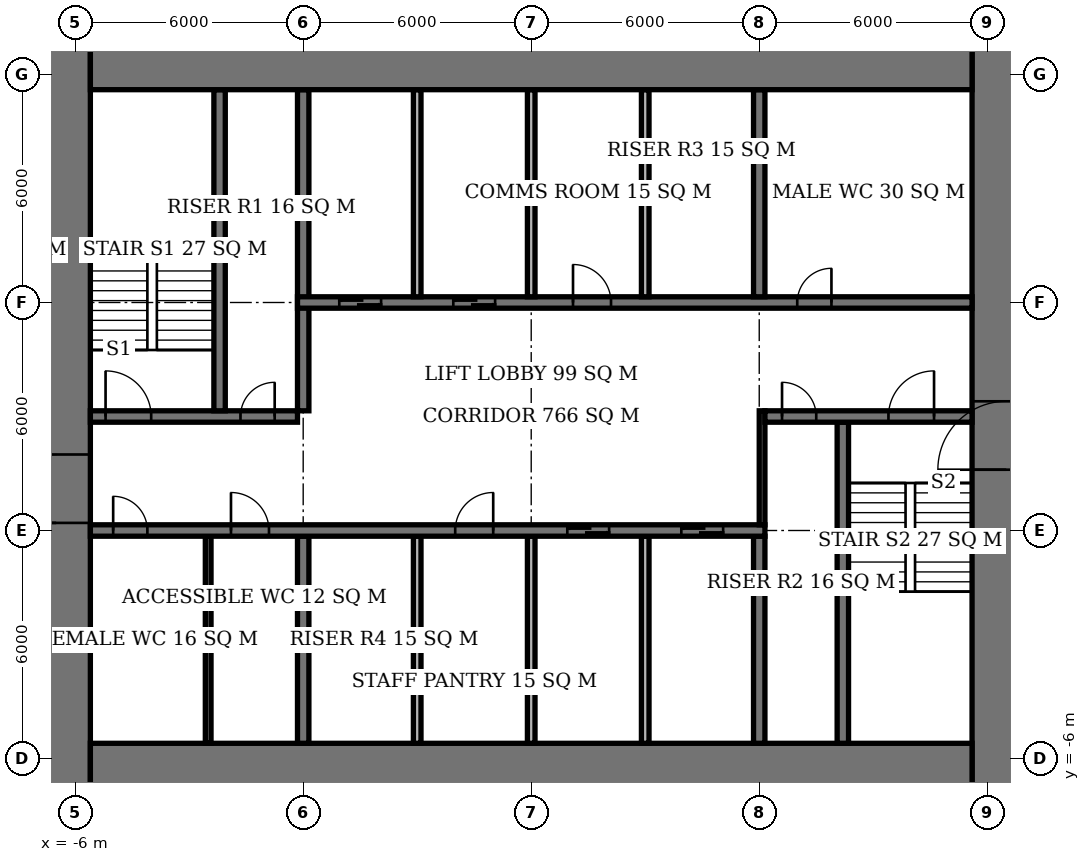
"""IFC4 building model, lengths in metres.
Left out: names, types, materials, properties, quantities, classifications, styles, units other than length and angle.
Written with IfcOpenShell. Run it as: python <this file> out.ifc"""

import sys

from ifc_helpers import new_model, si_unit, direction, frame, frame_2d, origin, place, context, subcontext, project, spatial, rectangle, extrude, element, fill, save


model = new_model("IFC4")
c1 = context("Model", 3, precision=1e-05, world=origin(), true_north=direction((0.0, 1.0)))
c2 = subcontext(c1, "Body", "Model", "MODEL_VIEW")
j1 = project(units=[si_unit("LENGTHUNIT", "METRE"), si_unit("PLANEANGLEUNIT", "RADIAN")], contexts=[c1])
p1 = place(None, origin())
s1 = spatial("IfcSite", under=j1, at=p1, CompositionType="ELEMENT")
p2 = place(p1, origin())
s2 = spatial("IfcBuilding", under=s1, at=p2, CompositionType="ELEMENT")
p3 = place(p2, frame((0.0, 0.0, 235.7)))
s3 = spatial("IfcBuildingStorey", under=s2, at=p3, CompositionType="ELEMENT", Elevation=235.7)
for number, where, z_axis, x_axis in (
    (1, (-5.6, -6.6, 0.0), (0.0, 0.0, 1.0), (1.0, 0.0, 0.0)),
    (2, (-5.6, 12.6, 0.0), (0.0, 0.0, 1.0), (1.0, 0.0, 0.0)),
):
    element("IfcWall", number, at=place(p3, frame(where, z_axis=z_axis, x_axis=x_axis)), inside=s3, PredefinedType="SHEAR", context=c2, shape_type="SweptSolid", body=[
        extrude(rectangle(XDim=23.2, YDim=2.0, at=frame_2d((11.6, 0.0))), origin(), (0.0, 0.0, 1.0), 3.9),
    ])
p4 = place(p3, frame((-6.5, -7.6, 0.0), z_axis=(0.0, 0.0, 1.0), x_axis=(0.0, 1.0, 0.0)))
e3 = element("IfcWall", 3, at=p4, inside=s3, PredefinedType="SHEAR", context=c2, shape_type="SweptSolid", body=[
    extrude(rectangle(XDim=21.2, YDim=1.8, at=frame_2d((10.6, 0.0))), origin(), (0.0, 0.0, 1.0), 3.9),
])
p5 = place(p4, frame((7.8, 0.0, 0.0)))
e4 = element("IfcOpeningElement", 4, at=p5, cuts=e3, PredefinedType="OPENING", context=c2, shape_type="SweptSolid", body=[
    extrude(rectangle(XDim=1.8, YDim=2.4, at=frame_2d((0.9, 1.2))), frame((0.0, 0.91, 0.0), z_axis=(0.0, -1.0, 0.0), x_axis=(1.0, 0.0, 0.0)), (0.0, 0.0, 1.0), 1.82),
])
p6 = place(p3, frame((18.5, -7.6, 0.0), z_axis=(0.0, 0.0, 1.0), x_axis=(0.0, 1.0, 0.0)))
e5 = element("IfcWall", 5, at=p6, inside=s3, PredefinedType="SHEAR", context=c2, shape_type="SweptSolid", body=[
    extrude(rectangle(XDim=21.2, YDim=1.8, at=frame_2d((10.6, 0.0))), origin(), (0.0, 0.0, 1.0), 3.9),
])
p7 = place(p6, frame((9.2, 0.0, 0.0)))
e6 = element("IfcOpeningElement", 6, at=p7, cuts=e5, PredefinedType="OPENING", context=c2, shape_type="SweptSolid", body=[
    extrude(rectangle(XDim=1.8, YDim=2.4, at=frame_2d((0.9, 1.2))), frame((0.0, 0.91, 0.0), z_axis=(0.0, -1.0, 0.0), x_axis=(1.0, 0.0, 0.0)), (0.0, 0.0, 1.0), 1.82),
])
p8 = place(p3, frame((-5.6, 0.0, 0.0), z_axis=(0.0, 0.0, 1.0), x_axis=(1.0, 0.0, 0.0)))
e7 = element("IfcWall", 7, at=p8, inside=s3, PredefinedType="SHEAR", context=c2, shape_type="SweptSolid", body=[
    extrude(rectangle(XDim=17.75, YDim=0.3, at=frame_2d((8.875, 0.0))), origin(), (0.0, 0.0, 1.0), 3.9),
])
p9 = place(p8, frame((0.6, 0.0, 0.0)))
e8 = element("IfcOpeningElement", 8, at=p9, cuts=e7, PredefinedType="OPENING", context=c2, shape_type="SweptSolid", body=[
    extrude(rectangle(XDim=0.9, YDim=2.1, at=frame_2d((0.45, 1.05))), frame((0.0, 0.16, 0.0), z_axis=(0.0, -1.0, 0.0), x_axis=(1.0, 0.0, 0.0)), (0.0, 0.0, 1.0), 0.32),
])
p10 = place(p8, frame((3.7, 0.0, 0.0)))
e9 = element("IfcOpeningElement", 9, at=p10, cuts=e7, PredefinedType="OPENING", context=c2, shape_type="SweptSolid", body=[
    extrude(rectangle(XDim=1.0, YDim=2.1, at=frame_2d((0.5, 1.05))), frame((0.0, 0.16, 0.0), z_axis=(0.0, -1.0, 0.0), x_axis=(1.0, 0.0, 0.0)), (0.0, 0.0, 1.0), 0.32),
])
p11 = place(p8, frame((9.6, 0.0, 0.0)))
e10 = element("IfcOpeningElement", 10, at=p11, cuts=e7, PredefinedType="OPENING", context=c2, shape_type="SweptSolid", body=[
    extrude(rectangle(XDim=1.0, YDim=2.1, at=frame_2d((0.5, 1.05))), frame((0.0, 0.16, 0.0), z_axis=(0.0, -1.0, 0.0), x_axis=(1.0, 0.0, 0.0)), (0.0, 0.0, 1.0), 0.32),
])
p12 = place(p8, frame((12.55, 0.0, 0.0)))
e11 = element("IfcOpeningElement", 11, at=p12, cuts=e7, PredefinedType="OPENING", context=c2, shape_type="SweptSolid", body=[
    extrude(rectangle(XDim=1.1, YDim=2.1, at=frame_2d((0.55, 1.05))), frame((0.0, 0.16, 0.0), z_axis=(0.0, -1.0, 0.0), x_axis=(1.0, 0.0, 0.0)), (0.0, 0.0, 1.0), 0.32),
])
p13 = place(p8, frame((15.55, 0.0, 0.0)))
e12 = element("IfcOpeningElement", 12, at=p13, cuts=e7, PredefinedType="OPENING", context=c2, shape_type="SweptSolid", body=[
    extrude(rectangle(XDim=1.1, YDim=2.1, at=frame_2d((0.55, 1.05))), frame((0.0, 0.16, 0.0), z_axis=(0.0, -1.0, 0.0), x_axis=(1.0, 0.0, 0.0)), (0.0, 0.0, 1.0), 0.32),
])
p14 = place(p3, frame((-5.6, 3.0, 0.0), z_axis=(0.0, 0.0, 1.0), x_axis=(1.0, 0.0, 0.0)))
e13 = element("IfcWall", 13, at=p14, inside=s3, PredefinedType="SHEAR", context=c2, shape_type="SweptSolid", body=[
    extrude(rectangle(XDim=5.45, YDim=0.3, at=frame_2d((2.725, 0.0))), origin(), (0.0, 0.0, 1.0), 3.9),
])
p15 = place(p14, frame((0.4, 0.0, 0.0)))
e14 = element("IfcOpeningElement", 14, at=p15, cuts=e13, PredefinedType="OPENING", context=c2, shape_type="SweptSolid", body=[
    extrude(rectangle(XDim=1.2, YDim=2.1, at=frame_2d((0.6, 1.05))), frame((0.0, 0.16, 0.0), z_axis=(0.0, -1.0, 0.0), x_axis=(1.0, 0.0, 0.0)), (0.0, 0.0, 1.0), 0.32),
])
p16 = place(p14, frame((3.95, 0.0, 0.0)))
e15 = element("IfcOpeningElement", 15, at=p16, cuts=e13, PredefinedType="OPENING", context=c2, shape_type="SweptSolid", body=[
    extrude(rectangle(XDim=0.9, YDim=2.1, at=frame_2d((0.45, 1.05))), frame((0.0, 0.16, 0.0), z_axis=(0.0, -1.0, 0.0), x_axis=(1.0, 0.0, 0.0)), (0.0, 0.0, 1.0), 0.32),
])
p17 = place(p3, frame((12.15, 3.0, 0.0), z_axis=(0.0, 0.0, 1.0), x_axis=(1.0, 0.0, 0.0)))
e16 = element("IfcWall", 16, at=p17, inside=s3, PredefinedType="SHEAR", context=c2, shape_type="SweptSolid", body=[
    extrude(rectangle(XDim=5.45, YDim=0.3, at=frame_2d((2.725, 0.0))), origin(), (0.0, 0.0, 1.0), 3.9),
])
p18 = place(p17, frame((3.25, 0.0, 0.0)))
e17 = element("IfcOpeningElement", 17, at=p18, cuts=e16, PredefinedType="OPENING", context=c2, shape_type="SweptSolid", body=[
    extrude(rectangle(XDim=1.2, YDim=2.1, at=frame_2d((0.6, 1.05))), frame((0.0, 0.16, 0.0), z_axis=(0.0, -1.0, 0.0), x_axis=(1.0, 0.0, 0.0)), (0.0, 0.0, 1.0), 0.32),
])
p19 = place(p17, frame((0.45, 0.0, 0.0)))
e18 = element("IfcOpeningElement", 18, at=p19, cuts=e16, PredefinedType="OPENING", context=c2, shape_type="SweptSolid", body=[
    extrude(rectangle(XDim=0.9, YDim=2.1, at=frame_2d((0.45, 1.05))), frame((0.0, 0.16, 0.0), z_axis=(0.0, -1.0, 0.0), x_axis=(1.0, 0.0, 0.0)), (0.0, 0.0, 1.0), 0.32),
])
p20 = place(p3, frame((-0.15, 6.0, 0.0), z_axis=(0.0, 0.0, 1.0), x_axis=(1.0, 0.0, 0.0)))
e19 = element("IfcWall", 19, at=p20, inside=s3, PredefinedType="SHEAR", context=c2, shape_type="SweptSolid", body=[
    extrude(rectangle(XDim=17.75, YDim=0.3, at=frame_2d((8.875, 0.0))), origin(), (0.0, 0.0, 1.0), 3.9),
])
p21 = place(p20, frame((13.15, 0.0, 0.0)))
e20 = element("IfcOpeningElement", 20, at=p21, cuts=e19, PredefinedType="OPENING", context=c2, shape_type="SweptSolid", body=[
    extrude(rectangle(XDim=0.9, YDim=2.1, at=frame_2d((0.45, 1.05))), frame((0.0, 0.16, 0.0), z_axis=(0.0, -1.0, 0.0), x_axis=(1.0, 0.0, 0.0)), (0.0, 0.0, 1.0), 0.32),
])
p22 = place(p20, frame((7.25, 0.0, 0.0)))
e21 = element("IfcOpeningElement", 21, at=p22, cuts=e19, PredefinedType="OPENING", context=c2, shape_type="SweptSolid", body=[
    extrude(rectangle(XDim=1.0, YDim=2.1, at=frame_2d((0.5, 1.05))), frame((0.0, 0.16, 0.0), z_axis=(0.0, -1.0, 0.0), x_axis=(1.0, 0.0, 0.0)), (0.0, 0.0, 1.0), 0.32),
])
p23 = place(p20, frame((1.1, 0.0, 0.0)))
e22 = element("IfcOpeningElement", 22, at=p23, cuts=e19, PredefinedType="OPENING", context=c2, shape_type="SweptSolid", body=[
    extrude(rectangle(XDim=1.1, YDim=2.1, at=frame_2d((0.55, 1.05))), frame((0.0, 0.16, 0.0), z_axis=(0.0, -1.0, 0.0), x_axis=(1.0, 0.0, 0.0)), (0.0, 0.0, 1.0), 0.32),
])
p24 = place(p20, frame((4.1, 0.0, 0.0)))
e23 = element("IfcOpeningElement", 23, at=p24, cuts=e19, PredefinedType="OPENING", context=c2, shape_type="SweptSolid", body=[
    extrude(rectangle(XDim=1.1, YDim=2.1, at=frame_2d((0.55, 1.05))), frame((0.0, 0.16, 0.0), z_axis=(0.0, -1.0, 0.0), x_axis=(1.0, 0.0, 0.0)), (0.0, 0.0, 1.0), 0.32),
])
p25 = place(p3, frame((0.0, -5.6, 0.0), z_axis=(0.0, 0.0, 1.0), x_axis=(0.0, 1.0, 0.0)))
e24 = element("IfcWall", 24, at=p25, inside=s3, PredefinedType="SHEAR", context=c2, shape_type="SweptSolid", body=[
    extrude(rectangle(XDim=5.45, YDim=0.3, at=frame_2d((2.725, 0.0))), origin(), (0.0, 0.0, 1.0), 3.9),
])
p26 = place(p3, frame((0.0, 3.15, 0.0), z_axis=(0.0, 0.0, 1.0), x_axis=(0.0, 1.0, 0.0)))
e25 = element("IfcWall", 25, at=p26, inside=s3, PredefinedType="SHEAR", context=c2, shape_type="SweptSolid", body=[
    extrude(rectangle(XDim=8.45, YDim=0.3, at=frame_2d((4.225, 0.0))), origin(), (0.0, 0.0, 1.0), 3.9),
])
for number, where, z_axis, x_axis in (
    (26, (12.0, -5.6, 0.0), (0.0, 0.0, 1.0), (0.0, 1.0, 0.0)),
    (27, (12.0, 6.15, 0.0), (0.0, 0.0, 1.0), (0.0, 1.0, 0.0)),
):
    element("IfcWall", number, at=place(p3, frame(where, z_axis=z_axis, x_axis=x_axis)), inside=s3, PredefinedType="SHEAR", context=c2, shape_type="SweptSolid", body=[
        extrude(rectangle(XDim=5.45, YDim=0.3, at=frame_2d((2.725, 0.0))), origin(), (0.0, 0.0, 1.0), 3.9),
    ])
for number, where, z_axis, x_axis in (
    (28, (-2.2, 3.15, 0.0), (0.0, 0.0, 1.0), (0.0, 1.0, 0.0)),
    (29, (14.2, -5.6, 0.0), (0.0, 0.0, 1.0), (0.0, 1.0, 0.0)),
):
    element("IfcWall", number, at=place(p3, frame(where, z_axis=z_axis, x_axis=x_axis)), inside=s3, PredefinedType="SHEAR", context=c2, shape_type="SweptSolid", body=[
        extrude(rectangle(XDim=8.45, YDim=0.3, at=frame_2d((4.225, 0.0))), origin(), (0.0, 0.0, 1.0), 3.9),
    ])
for number, where, z_axis, x_axis in (
    (30, (3.0, 6.15, 0.0), (0.0, 0.0, 1.0), (0.0, 1.0, 0.0)),
    (31, (6.0, 6.15, 0.0), (0.0, 0.0, 1.0), (0.0, 1.0, 0.0)),
    (32, (9.0, 6.15, 0.0), (0.0, 0.0, 1.0), (0.0, 1.0, 0.0)),
    (33, (3.0, -5.6, 0.0), (0.0, 0.0, 1.0), (0.0, 1.0, 0.0)),
    (34, (6.0, -5.6, 0.0), (0.0, 0.0, 1.0), (0.0, 1.0, 0.0)),
    (35, (9.0, -5.6, 0.0), (0.0, 0.0, 1.0), (0.0, 1.0, 0.0)),
):
    element("IfcWall", number, at=place(p3, frame(where, z_axis=z_axis, x_axis=x_axis)), inside=s3, PredefinedType="SOLIDWALL", context=c2, shape_type="SweptSolid", body=[
        extrude(rectangle(XDim=5.45, YDim=0.2, at=frame_2d((2.725, 0.0))), origin(), (0.0, 0.0, 1.0), 3.9),
    ])
p27 = place(p3, frame((-2.5, -5.6, 0.0), z_axis=(0.0, 0.0, 1.0), x_axis=(0.0, 1.0, 0.0)))
e36 = element("IfcWall", 36, at=p27, inside=s3, PredefinedType="PLUMBINGWALL", context=c2, shape_type="SweptSolid", body=[
    extrude(rectangle(XDim=5.45, YDim=0.15, at=frame_2d((2.725, 0.0))), origin(), (0.0, 0.0, 1.0), 3.65),
])
p28 = place(p3, frame((12.075, 0.15, 0.0), z_axis=(0.0, 0.0, 1.0), x_axis=(0.0, 1.0, 0.0)))
e37 = element("IfcWall", 37, at=p28, inside=s3, PredefinedType="PARTITIONING", context=c2, shape_type="SweptSolid", body=[
    extrude(rectangle(XDim=3.0, YDim=0.15, at=frame_2d((1.5, 0.0))), origin(), (0.0, 0.0, 1.0), 3.65),
])
p29 = place(p5, origin())
e38 = element("IfcDoor", 38, at=p29, inside=s3, OperationType="DOUBLE_DOOR_SINGLE_SWING", PredefinedType="DOOR", context=c2, shape_type="SweptSolid", body=[
    extrude(rectangle(XDim=1.8, YDim=2.4, at=frame_2d((0.9, 1.2))), frame((0.0, 0.025, 0.0), z_axis=(0.0, -1.0, 0.0), x_axis=(1.0, 0.0, 0.0)), (0.0, 0.0, 1.0), 0.05),
])
fill(e4, e38)
p30 = place(p7, origin())
e39 = element("IfcDoor", 39, at=p30, inside=s3, OperationType="DOUBLE_DOOR_SINGLE_SWING", PredefinedType="DOOR", context=c2, shape_type="SweptSolid", body=[
    extrude(rectangle(XDim=1.8, YDim=2.4, at=frame_2d((0.9, 1.2))), frame((0.0, 0.025, 0.0), z_axis=(0.0, -1.0, 0.0), x_axis=(1.0, 0.0, 0.0)), (0.0, 0.0, 1.0), 0.05),
])
fill(e6, e39)
p31 = place(p15, origin())
e40 = element("IfcDoor", 40, at=p31, inside=s3, OperationType="SINGLE_SWING_LEFT", PredefinedType="DOOR", context=c2, shape_type="SweptSolid", body=[
    extrude(rectangle(XDim=1.2, YDim=2.1, at=frame_2d((0.6, 1.05))), frame((0.0, 0.025, 0.0), z_axis=(0.0, -1.0, 0.0), x_axis=(1.0, 0.0, 0.0)), (0.0, 0.0, 1.0), 0.05),
])
fill(e14, e40)
p32 = place(p16, origin())
e41 = element("IfcDoor", 41, at=p32, inside=s3, OperationType="SINGLE_SWING_RIGHT", PredefinedType="DOOR", context=c2, shape_type="SweptSolid", body=[
    extrude(rectangle(XDim=0.9, YDim=2.1, at=frame_2d((0.45, 1.05))), frame((0.0, 0.025, 0.0), z_axis=(0.0, -1.0, 0.0), x_axis=(1.0, 0.0, 0.0)), (0.0, 0.0, 1.0), 0.05),
])
fill(e15, e41)
p33 = place(p18, origin())
e42 = element("IfcDoor", 42, at=p33, inside=s3, OperationType="SINGLE_SWING_RIGHT", PredefinedType="DOOR", context=c2, shape_type="SweptSolid", body=[
    extrude(rectangle(XDim=1.2, YDim=2.1, at=frame_2d((0.6, 1.05))), frame((0.0, 0.025, 0.0), z_axis=(0.0, -1.0, 0.0), x_axis=(1.0, 0.0, 0.0)), (0.0, 0.0, 1.0), 0.05),
])
fill(e17, e42)
p34 = place(p19, origin())
e43 = element("IfcDoor", 43, at=p34, inside=s3, OperationType="SINGLE_SWING_LEFT", PredefinedType="DOOR", context=c2, shape_type="SweptSolid", body=[
    extrude(rectangle(XDim=0.9, YDim=2.1, at=frame_2d((0.45, 1.05))), frame((0.0, 0.025, 0.0), z_axis=(0.0, -1.0, 0.0), x_axis=(1.0, 0.0, 0.0)), (0.0, 0.0, 1.0), 0.05),
])
fill(e18, e43)
p35 = place(p9, origin())
e44 = element("IfcDoor", 44, at=p35, inside=s3, OperationType="SINGLE_SWING_LEFT", PredefinedType="DOOR", context=c2, shape_type="SweptSolid", body=[
    extrude(rectangle(XDim=0.9, YDim=2.1, at=frame_2d((0.45, 1.05))), frame((0.0, 0.025, 0.0), z_axis=(0.0, -1.0, 0.0), x_axis=(1.0, 0.0, 0.0)), (0.0, 0.0, 1.0), 0.05),
])
fill(e8, e44)
p36 = place(p10, origin())
e45 = element("IfcDoor", 45, at=p36, inside=s3, OperationType="SINGLE_SWING_LEFT", PredefinedType="DOOR", context=c2, shape_type="SweptSolid", body=[
    extrude(rectangle(XDim=1.0, YDim=2.1, at=frame_2d((0.5, 1.05))), frame((0.0, 0.025, 0.0), z_axis=(0.0, -1.0, 0.0), x_axis=(1.0, 0.0, 0.0)), (0.0, 0.0, 1.0), 0.05),
])
fill(e9, e45)
p37 = place(p21, origin())
e46 = element("IfcDoor", 46, at=p37, inside=s3, OperationType="SINGLE_SWING_RIGHT", PredefinedType="DOOR", context=c2, shape_type="SweptSolid", body=[
    extrude(rectangle(XDim=0.9, YDim=2.1, at=frame_2d((0.45, 1.05))), frame((0.0, 0.025, 0.0), z_axis=(0.0, -1.0, 0.0), x_axis=(1.0, 0.0, 0.0)), (0.0, 0.0, 1.0), 0.05),
])
fill(e20, e46)
p38 = place(p22, origin())
e47 = element("IfcDoor", 47, at=p38, inside=s3, OperationType="SINGLE_SWING_LEFT", PredefinedType="DOOR", context=c2, shape_type="SweptSolid", body=[
    extrude(rectangle(XDim=1.0, YDim=2.1, at=frame_2d((0.5, 1.05))), frame((0.0, 0.025, 0.0), z_axis=(0.0, -1.0, 0.0), x_axis=(1.0, 0.0, 0.0)), (0.0, 0.0, 1.0), 0.05),
])
fill(e21, e47)
p39 = place(p11, origin())
e48 = element("IfcDoor", 48, at=p39, inside=s3, OperationType="SINGLE_SWING_RIGHT", PredefinedType="DOOR", context=c2, shape_type="SweptSolid", body=[
    extrude(rectangle(XDim=1.0, YDim=2.1, at=frame_2d((0.5, 1.05))), frame((0.0, 0.025, 0.0), z_axis=(0.0, -1.0, 0.0), x_axis=(1.0, 0.0, 0.0)), (0.0, 0.0, 1.0), 0.05),
])
fill(e10, e48)
p40 = place(p23, origin())
e49 = element("IfcDoor", 49, at=p40, inside=s3, OperationType="DOUBLE_DOOR_SLIDING", PredefinedType="USERDEFINED", context=c2, shape_type="SweptSolid", body=[
    extrude(rectangle(XDim=1.1, YDim=2.1, at=frame_2d((0.55, 1.05))), frame((0.0, 0.025, 0.0), z_axis=(0.0, -1.0, 0.0), x_axis=(1.0, 0.0, 0.0)), (0.0, 0.0, 1.0), 0.05),
])
fill(e22, e49)
p41 = place(p24, origin())
e50 = element("IfcDoor", 50, at=p41, inside=s3, OperationType="DOUBLE_DOOR_SLIDING", PredefinedType="USERDEFINED", context=c2, shape_type="SweptSolid", body=[
    extrude(rectangle(XDim=1.1, YDim=2.1, at=frame_2d((0.55, 1.05))), frame((0.0, 0.025, 0.0), z_axis=(0.0, -1.0, 0.0), x_axis=(1.0, 0.0, 0.0)), (0.0, 0.0, 1.0), 0.05),
])
fill(e23, e50)
p42 = place(p12, origin())
e51 = element("IfcDoor", 51, at=p42, inside=s3, OperationType="DOUBLE_DOOR_SLIDING", PredefinedType="USERDEFINED", context=c2, shape_type="SweptSolid", body=[
    extrude(rectangle(XDim=1.1, YDim=2.1, at=frame_2d((0.55, 1.05))), frame((0.0, 0.025, 0.0), z_axis=(0.0, -1.0, 0.0), x_axis=(1.0, 0.0, 0.0)), (0.0, 0.0, 1.0), 0.05),
])
fill(e11, e51)
p43 = place(p13, origin())
e52 = element("IfcDoor", 52, at=p43, inside=s3, OperationType="DOUBLE_DOOR_SLIDING", PredefinedType="USERDEFINED", context=c2, shape_type="SweptSolid", body=[
    extrude(rectangle(XDim=1.1, YDim=2.1, at=frame_2d((0.55, 1.05))), frame((0.0, 0.025, 0.0), z_axis=(0.0, -1.0, 0.0), x_axis=(1.0, 0.0, 0.0)), (0.0, 0.0, 1.0), 0.05),
])
fill(e12, e52)
save(model, sys.argv[1])
